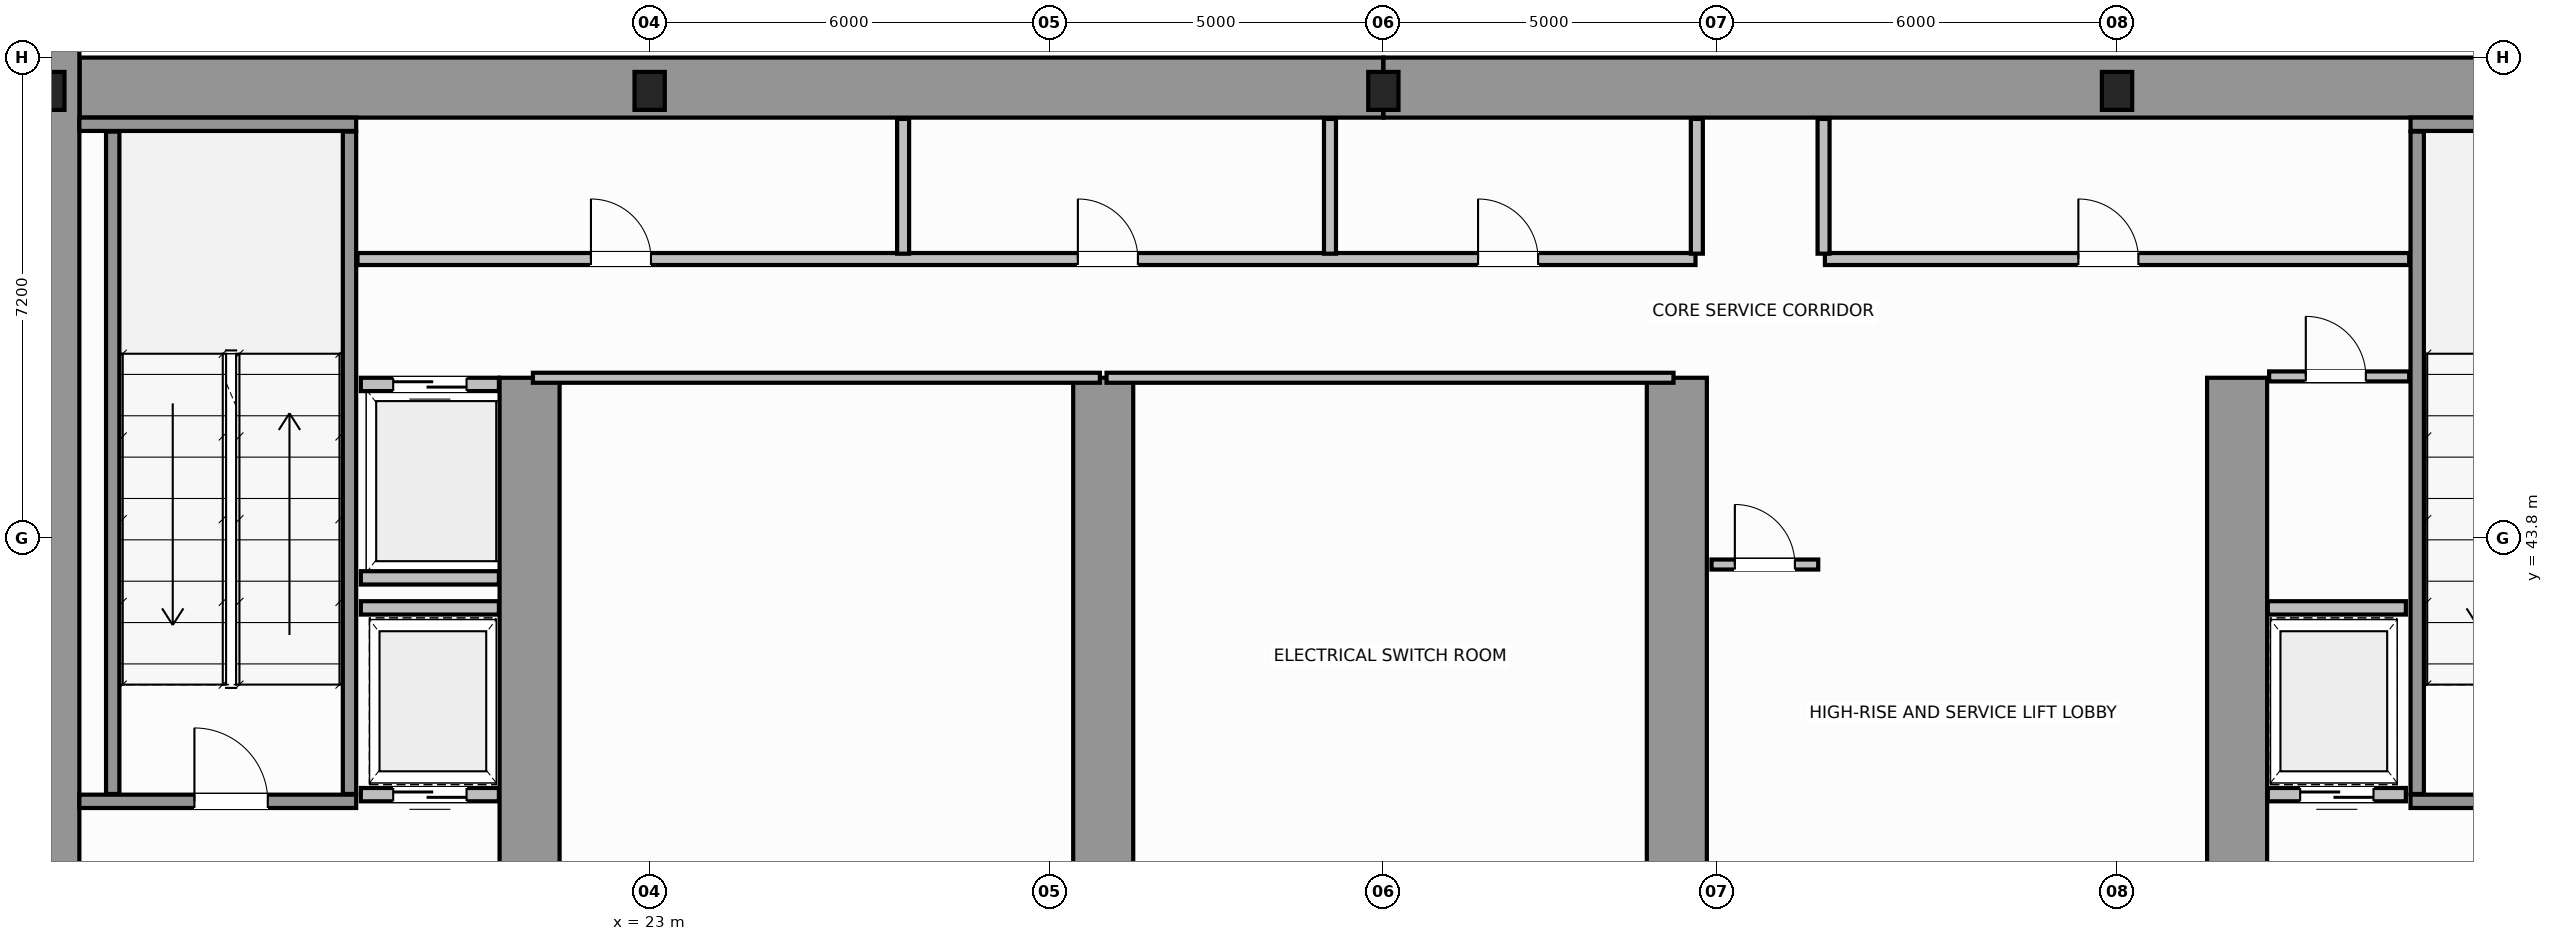
"""IFC4 building model, lengths in metres.
Left out: names, types, materials, properties, quantities, classifications, styles, units other than length and angle.
Written with IfcOpenShell. Run it as: python <this file> out.ifc"""

import sys

from ifc_helpers import new_model, si_unit, direction, frame, frame_2d, origin, origin_2d, place, context, subcontext, project, spatial, rectangle, i_section, extrude, source, transform, mapped, element, fill, save


model = new_model("IFC4")
c1 = context("Model", 3, precision=1e-05, world=origin(), true_north=direction((0.0, 1.0)))
c2 = subcontext(c1, "Body", "Model", "MODEL_VIEW")
j1 = project(units=[si_unit("LENGTHUNIT", "METRE"), si_unit("PLANEANGLEUNIT", "RADIAN")], contexts=[c1])
p1 = place(None, origin())
s1 = spatial("IfcSite", under=j1, at=p1, CompositionType="ELEMENT")
p2 = place(p1, origin())
s2 = spatial("IfcBuilding", under=s1, at=p2, CompositionType="ELEMENT")
p3 = place(p2, frame((0.0, 0.0, -10.4)))
s3 = spatial("IfcBuildingStorey", under=s2, at=p3, CompositionType="ELEMENT", Elevation=-10.4)
m1 = source(origin(), c2, "Body", "SweptSolid", [
    extrude(i_section(OverallWidth=0.454, OverallDepth=0.569, WebThickness=0.078, FlangeThickness=0.08, FilletRadius=0.015, at=origin_2d()), origin(), (0.0, 0.0, 1.0), 5.2),
])
for number, where, z_axis, x_axis in (
    (1, (14.0, 50.5, 0.0), (0.0, 0.0, 1.0), (1.0, 0.0, 0.0)),
    (2, (23.0, 50.5, 0.0), (0.0, 0.0, 1.0), (1.0, 0.0, 0.0)),
    (3, (34.0, 50.5, 0.0), (0.0, 0.0, 1.0), (1.0, 0.0, 0.0)),
    (4, (45.0, 50.5, 0.0), (0.0, 0.0, 1.0), (1.0, 0.0, 0.0)),
):
    element("IfcColumn", number, at=place(p3, frame(where, z_axis=z_axis, x_axis=x_axis)), inside=s3, PredefinedType="COLUMN", context=c2, shape_type="MappedRepresentation", body=[
        mapped(m1, transform((0.0, 0.0, 0.0), scale=1.0)),
    ])
for number, where, z_axis, x_axis in (
    (5, (14.454, 50.55, 0.0), (0.0, 0.0, 1.0), (1.0, 0.0, 0.0)),
    (6, (34.002, 50.55, 0.0), (0.0, 0.0, 1.0), (1.0, 0.0, 0.0)),
):
    element("IfcWall", number, at=place(p3, frame(where, z_axis=z_axis, x_axis=x_axis)), inside=s3, PredefinedType="SHEAR", context=c2, shape_type="SweptSolid", body=[
        extrude(rectangle(XDim=19.544, YDim=0.9, at=frame_2d((9.772, 0.0))), origin(), (0.0, 0.0, 1.0), 5.2),
    ])
p4 = place(p3, frame((14.0, 36.5, 0.0), z_axis=(0.0, 0.0, 1.0), x_axis=(0.0, 1.0, 0.0)))
e7 = element("IfcWall", 7, at=p4, inside=s3, PredefinedType="SHEAR", context=c2, shape_type="SweptSolid", body=[
    extrude(rectangle(XDim=15.0, YDim=0.9, at=frame_2d((7.5, 0.0))), origin(), (0.0, 0.0, 1.0), 5.2),
])
for number, where, z_axis, x_axis in (
    (8, (21.2, 36.97, 0.0), (0.0, 0.0, 1.0), (0.0, 1.0, 0.0)),
    (9, (29.8, 36.97, 0.0), (0.0, 0.0, 1.0), (0.0, 1.0, 0.0)),
    (10, (38.4, 36.97, 0.0), (0.0, 0.0, 1.0), (0.0, 1.0, 0.0)),
    (11, (46.8, 36.97, 0.0), (0.0, 0.0, 1.0), (0.0, 1.0, 0.0)),
):
    element("IfcWall", number, at=place(p3, frame(where, z_axis=z_axis, x_axis=x_axis)), inside=s3, PredefinedType="SHEAR", context=c2, shape_type="SweptSolid", body=[
        extrude(rectangle(XDim=9.23, YDim=0.9, at=frame_2d((4.615, 0.0))), origin(), (0.0, 0.0, 1.0), 5.2),
    ])
p5 = place(p3, frame((14.45, 39.85, 0.0), z_axis=(0.0, 0.0, 1.0), x_axis=(1.0, 0.0, 0.0)))
e12 = element("IfcWall", 12, at=p5, inside=s3, PredefinedType="SOLIDWALL", context=c2, shape_type="SweptSolid", body=[
    extrude(rectangle(XDim=4.15, YDim=0.2, at=frame_2d((2.075, 0.0))), origin(), (0.0, 0.0, 1.0), 5.2),
])
p6 = place(p5, frame((1.725, 0.0, 0.0)))
e13 = element("IfcOpeningElement", 13, at=p6, cuts=e12, PredefinedType="OPENING", context=c2, shape_type="SweptSolid", body=[
    extrude(rectangle(XDim=1.1, YDim=2.15, at=frame_2d((0.55, 1.075))), frame((0.0, 0.11, 0.0), z_axis=(0.0, -1.0, 0.0), x_axis=(1.0, 0.0, 0.0)), (0.0, 0.0, 1.0), 0.22),
])
p7 = place(p3, frame((14.45, 50.0, 0.0), z_axis=(0.0, 0.0, 1.0), x_axis=(1.0, 0.0, 0.0)))
e14 = element("IfcWall", 14, at=p7, inside=s3, PredefinedType="SOLIDWALL", context=c2, shape_type="SweptSolid", body=[
    extrude(rectangle(XDim=4.15, YDim=0.2, at=frame_2d((2.075, 0.0))), origin(), (0.0, 0.0, 1.0), 5.2),
])
for number, where, z_axis, x_axis in (
    (15, (14.95, 39.96, 0.0), (0.0, 0.0, 1.0), (0.0, 1.0, 0.0)),
    (16, (18.5, 39.96, 0.0), (0.0, 0.0, 1.0), (0.0, 1.0, 0.0)),
):
    element("IfcWall", number, at=place(p3, frame(where, z_axis=z_axis, x_axis=x_axis)), inside=s3, PredefinedType="SOLIDWALL", context=c2, shape_type="SweptSolid", body=[
        extrude(rectangle(XDim=9.93, YDim=0.2, at=frame_2d((4.965, 0.0))), origin(), (0.0, 0.0, 1.0), 5.2),
    ])
p8 = place(p3, frame((49.4, 39.85, 0.0), z_axis=(0.0, 0.0, 1.0), x_axis=(1.0, 0.0, 0.0)))
e17 = element("IfcWall", 17, at=p8, inside=s3, PredefinedType="SOLIDWALL", context=c2, shape_type="SweptSolid", body=[
    extrude(rectangle(XDim=4.15, YDim=0.2, at=frame_2d((2.075, 0.0))), origin(), (0.0, 0.0, 1.0), 5.2),
])
p9 = place(p8, frame((1.325, 0.0, 0.0)))
e18 = element("IfcOpeningElement", 18, at=p9, cuts=e17, PredefinedType="OPENING", context=c2, shape_type="SweptSolid", body=[
    extrude(rectangle(XDim=1.1, YDim=2.15, at=frame_2d((0.55, 1.075))), frame((0.0, 0.11, 0.0), z_axis=(0.0, -1.0, 0.0), x_axis=(1.0, 0.0, 0.0)), (0.0, 0.0, 1.0), 0.22),
])
p10 = place(p3, frame((49.4, 50.0, 0.0), z_axis=(0.0, 0.0, 1.0), x_axis=(1.0, 0.0, 0.0)))
e19 = element("IfcWall", 19, at=p10, inside=s3, PredefinedType="SOLIDWALL", context=c2, shape_type="SweptSolid", body=[
    extrude(rectangle(XDim=4.15, YDim=0.2, at=frame_2d((2.075, 0.0))), origin(), (0.0, 0.0, 1.0), 5.2),
])
p11 = place(p3, frame((49.5, 39.96, 0.0), z_axis=(0.0, 0.0, 1.0), x_axis=(0.0, 1.0, 0.0)))
e20 = element("IfcWall", 20, at=p11, inside=s3, PredefinedType="SOLIDWALL", context=c2, shape_type="SweptSolid", body=[
    extrude(rectangle(XDim=9.93, YDim=0.2, at=frame_2d((4.965, 0.0))), origin(), (0.0, 0.0, 1.0), 5.2),
])
p12 = place(p3, frame((18.67, 46.1, 0.0), z_axis=(0.0, 0.0, 1.0), x_axis=(1.0, 0.0, 0.0)))
e21 = element("IfcWall", 21, at=p12, inside=s3, PredefinedType="SOLIDWALL", context=c2, shape_type="SweptSolid", body=[
    extrude(rectangle(XDim=2.07, YDim=0.2, at=frame_2d((1.035, 0.0))), origin(), (0.0, 0.0, 1.0), 4.88),
])
p13 = place(p12, frame((0.485, 0.0, 0.0)))
e22 = element("IfcOpeningElement", 22, at=p13, cuts=e21, PredefinedType="OPENING", context=c2, shape_type="SweptSolid", body=[
    extrude(rectangle(XDim=1.1, YDim=2.15, at=frame_2d((0.55, 1.075))), frame((0.0, 0.11, 0.0), z_axis=(0.0, -1.0, 0.0), x_axis=(1.0, 0.0, 0.0)), (0.0, 0.0, 1.0), 0.22),
])
p14 = place(p3, frame((18.67, 43.2, 0.0), z_axis=(0.0, 0.0, 1.0), x_axis=(1.0, 0.0, 0.0)))
e23 = element("IfcWall", 23, at=p14, inside=s3, PredefinedType="SOLIDWALL", context=c2, shape_type="SweptSolid", body=[
    extrude(rectangle(XDim=2.07, YDim=0.2, at=frame_2d((1.035, 0.0))), origin(), (0.0, 0.0, 1.0), 4.88),
])
p15 = place(p3, frame((18.67, 39.95, 0.0), z_axis=(0.0, 0.0, 1.0), x_axis=(1.0, 0.0, 0.0)))
e24 = element("IfcWall", 24, at=p15, inside=s3, PredefinedType="SOLIDWALL", context=c2, shape_type="SweptSolid", body=[
    extrude(rectangle(XDim=2.07, YDim=0.2, at=frame_2d((1.035, 0.0))), origin(), (0.0, 0.0, 1.0), 4.88),
])
p16 = place(p15, frame((0.485, 0.0, 0.0)))
e25 = element("IfcOpeningElement", 25, at=p16, cuts=e24, PredefinedType="OPENING", context=c2, shape_type="SweptSolid", body=[
    extrude(rectangle(XDim=1.1, YDim=2.15, at=frame_2d((0.55, 1.075))), frame((0.0, 0.11, 0.0), z_axis=(0.0, -1.0, 0.0), x_axis=(1.0, 0.0, 0.0)), (0.0, 0.0, 1.0), 0.22),
])
p17 = place(p3, frame((18.67, 42.75, 0.0), z_axis=(0.0, 0.0, 1.0), x_axis=(1.0, 0.0, 0.0)))
e26 = element("IfcWall", 26, at=p17, inside=s3, PredefinedType="SOLIDWALL", context=c2, shape_type="SweptSolid", body=[
    extrude(rectangle(XDim=2.07, YDim=0.2, at=frame_2d((1.035, 0.0))), origin(), (0.0, 0.0, 1.0), 4.88),
])
p18 = place(p3, frame((47.26, 39.95, 0.0), z_axis=(0.0, 0.0, 1.0), x_axis=(1.0, 0.0, 0.0)))
e27 = element("IfcWall", 27, at=p18, inside=s3, PredefinedType="SOLIDWALL", context=c2, shape_type="SweptSolid", body=[
    extrude(rectangle(XDim=2.07, YDim=0.2, at=frame_2d((1.035, 0.0))), origin(), (0.0, 0.0, 1.0), 4.88),
])
p19 = place(p18, frame((0.485, 0.0, 0.0)))
e28 = element("IfcOpeningElement", 28, at=p19, cuts=e27, PredefinedType="OPENING", context=c2, shape_type="SweptSolid", body=[
    extrude(rectangle(XDim=1.1, YDim=2.15, at=frame_2d((0.55, 1.075))), frame((0.0, 0.11, 0.0), z_axis=(0.0, -1.0, 0.0), x_axis=(1.0, 0.0, 0.0)), (0.0, 0.0, 1.0), 0.22),
])
p20 = place(p3, frame((47.26, 42.75, 0.0), z_axis=(0.0, 0.0, 1.0), x_axis=(1.0, 0.0, 0.0)))
e29 = element("IfcWall", 29, at=p20, inside=s3, PredefinedType="SOLIDWALL", context=c2, shape_type="SweptSolid", body=[
    extrude(rectangle(XDim=2.07, YDim=0.2, at=frame_2d((1.035, 0.0))), origin(), (0.0, 0.0, 1.0), 4.88),
])
for number, where, z_axis, x_axis in (
    (30, (21.25, 46.2, 0.0), (0.0, 0.0, 1.0), (1.0, 0.0, 0.0)),
    (31, (29.85, 46.2, 0.0), (0.0, 0.0, 1.0), (1.0, 0.0, 0.0)),
):
    element("IfcWall", number, at=place(p3, frame(where, z_axis=z_axis, x_axis=x_axis)), inside=s3, PredefinedType="PARTITIONING", context=c2, shape_type="SweptSolid", body=[
        extrude(rectangle(XDim=8.5, YDim=0.15, at=frame_2d((4.25, 0.0))), origin(), (0.0, 0.0, 1.0), 4.88),
    ])
p21 = place(p3, frame((47.28, 46.22, 0.0), z_axis=(0.0, 0.0, 1.0), x_axis=(1.0, 0.0, 0.0)))
e32 = element("IfcWall", 32, at=p21, inside=s3, PredefinedType="PARTITIONING", context=c2, shape_type="SweptSolid", body=[
    extrude(rectangle(XDim=2.1, YDim=0.15, at=frame_2d((1.05, 0.0))), origin(), (0.0, 0.0, 1.0), 4.88),
])
p22 = place(p21, frame((0.55, 0.0, 0.0)))
e33 = element("IfcOpeningElement", 33, at=p22, cuts=e32, PredefinedType="OPENING", context=c2, shape_type="SweptSolid", body=[
    extrude(rectangle(XDim=0.9, YDim=2.1, at=frame_2d((0.45, 1.05))), frame((0.0, 0.085, 0.0), z_axis=(0.0, -1.0, 0.0), x_axis=(1.0, 0.0, 0.0)), (0.0, 0.0, 1.0), 0.17),
])
p23 = place(p3, frame((38.92, 43.4, 0.0), z_axis=(0.0, 0.0, 1.0), x_axis=(1.0, 0.0, 0.0)))
e34 = element("IfcWall", 34, at=p23, inside=s3, PredefinedType="PARTITIONING", context=c2, shape_type="SweptSolid", body=[
    extrude(rectangle(XDim=1.6, YDim=0.15, at=frame_2d((0.8, 0.0))), origin(), (0.0, 0.0, 1.0), 4.88),
])
p24 = place(p23, frame((0.35, 0.0, 0.0)))
e35 = element("IfcOpeningElement", 35, at=p24, cuts=e34, PredefinedType="OPENING", context=c2, shape_type="SweptSolid", body=[
    extrude(rectangle(XDim=0.9, YDim=2.1, at=frame_2d((0.45, 1.05))), frame((0.0, 0.085, 0.0), z_axis=(0.0, -1.0, 0.0), x_axis=(1.0, 0.0, 0.0)), (0.0, 0.0, 1.0), 0.17),
])
p25 = place(p3, frame((18.62, 47.98, 0.0), z_axis=(0.0, 0.0, 1.0), x_axis=(1.0, 0.0, 0.0)))
e36 = element("IfcWall", 36, at=p25, inside=s3, PredefinedType="PLUMBINGWALL", context=c2, shape_type="SweptSolid", body=[
    extrude(rectangle(XDim=20.06, YDim=0.18, at=frame_2d((10.03, 0.0))), origin(), (0.0, 0.0, 1.0), 4.88),
])
p26 = place(p25, frame((3.5, 0.0, 0.0)))
e37 = element("IfcOpeningElement", 37, at=p26, cuts=e36, PredefinedType="OPENING", context=c2, shape_type="SweptSolid", body=[
    extrude(rectangle(XDim=0.9, YDim=2.15, at=frame_2d((0.45, 1.075))), frame((0.0, 0.1, 0.0), z_axis=(0.0, -1.0, 0.0), x_axis=(1.0, 0.0, 0.0)), (0.0, 0.0, 1.0), 0.2),
])
p27 = place(p25, frame((10.8, 0.0, 0.0)))
e38 = element("IfcOpeningElement", 38, at=p27, cuts=e36, PredefinedType="OPENING", context=c2, shape_type="SweptSolid", body=[
    extrude(rectangle(XDim=0.9, YDim=2.15, at=frame_2d((0.45, 1.075))), frame((0.0, 0.1, 0.0), z_axis=(0.0, -1.0, 0.0), x_axis=(1.0, 0.0, 0.0)), (0.0, 0.0, 1.0), 0.2),
])
p28 = place(p25, frame((16.8, 0.0, 0.0)))
e39 = element("IfcOpeningElement", 39, at=p28, cuts=e36, PredefinedType="OPENING", context=c2, shape_type="SweptSolid", body=[
    extrude(rectangle(XDim=0.9, YDim=2.15, at=frame_2d((0.45, 1.075))), frame((0.0, 0.1, 0.0), z_axis=(0.0, -1.0, 0.0), x_axis=(1.0, 0.0, 0.0)), (0.0, 0.0, 1.0), 0.2),
])
p29 = place(p3, frame((40.62, 47.98, 0.0), z_axis=(0.0, 0.0, 1.0), x_axis=(1.0, 0.0, 0.0)))
e40 = element("IfcWall", 40, at=p29, inside=s3, PredefinedType="PLUMBINGWALL", context=c2, shape_type="SweptSolid", body=[
    extrude(rectangle(XDim=8.76, YDim=0.18, at=frame_2d((4.38, 0.0))), origin(), (0.0, 0.0, 1.0), 4.88),
])
p30 = place(p29, frame((3.8, 0.0, 0.0)))
e41 = element("IfcOpeningElement", 41, at=p30, cuts=e40, PredefinedType="OPENING", context=c2, shape_type="SweptSolid", body=[
    extrude(rectangle(XDim=0.9, YDim=2.15, at=frame_2d((0.45, 1.075))), frame((0.0, 0.1, 0.0), z_axis=(0.0, -1.0, 0.0), x_axis=(1.0, 0.0, 0.0)), (0.0, 0.0, 1.0), 0.2),
])
for number, where, z_axis, x_axis in (
    (42, (26.8, 48.06, 0.0), (0.0, 0.0, 1.0), (0.0, 1.0, 0.0)),
    (43, (33.2, 48.06, 0.0), (0.0, 0.0, 1.0), (0.0, 1.0, 0.0)),
    (44, (38.7, 48.06, 0.0), (0.0, 0.0, 1.0), (0.0, 1.0, 0.0)),
    (45, (40.6, 48.06, 0.0), (0.0, 0.0, 1.0), (0.0, 1.0, 0.0)),
):
    element("IfcWall", number, at=place(p3, frame(where, z_axis=z_axis, x_axis=x_axis)), inside=s3, PredefinedType="PLUMBINGWALL", context=c2, shape_type="SweptSolid", body=[
        extrude(rectangle(XDim=2.02, YDim=0.18, at=frame_2d((1.01, 0.0))), origin(), (0.0, 0.0, 1.0), 4.88),
    ])
m2 = source(origin(), c2, "Body", "SweptSolid", [
    extrude(rectangle(XDim=1.1, YDim=2.15, at=frame_2d((0.55, 1.075))), frame((0.0, 0.025, 0.0), z_axis=(0.0, -1.0, 0.0), x_axis=(1.0, 0.0, 0.0)), (0.0, 0.0, 1.0), 0.05),
])
p31 = place(p6, origin())
e46 = element("IfcDoor", 46, at=p31, inside=s3, OperationType="SINGLE_SWING_LEFT", PredefinedType="DOOR", context=c2, shape_type="MappedRepresentation", body=[
    mapped(m2, transform((0.0, 0.0, 0.0), scale=1.0)),
])
fill(e13, e46)
p32 = place(p13, origin())
e47 = element("IfcDoor", 47, at=p32, inside=s3, OperationType="DOUBLE_DOOR_SLIDING", PredefinedType="DOOR", context=c2, shape_type="MappedRepresentation", body=[
    mapped(m2, transform((0.0, 0.0, 0.0), scale=1.0)),
])
fill(e22, e47)
p33 = place(p16, origin())
e48 = element("IfcDoor", 48, at=p33, inside=s3, OperationType="DOUBLE_DOOR_SLIDING", PredefinedType="DOOR", context=c2, shape_type="MappedRepresentation", body=[
    mapped(m2, transform((0.0, 0.0, 0.0), scale=1.0)),
])
fill(e25, e48)
p34 = place(p19, origin())
e49 = element("IfcDoor", 49, at=p34, inside=s3, OperationType="DOUBLE_DOOR_SLIDING", PredefinedType="DOOR", context=c2, shape_type="MappedRepresentation", body=[
    mapped(m2, transform((0.0, 0.0, 0.0), scale=1.0)),
])
fill(e28, e49)
m3 = source(origin(), c2, "Body", "SweptSolid", [
    extrude(rectangle(XDim=0.9, YDim=2.1, at=frame_2d((0.45, 1.05))), frame((0.0, 0.025, 0.0), z_axis=(0.0, -1.0, 0.0), x_axis=(1.0, 0.0, 0.0)), (0.0, 0.0, 1.0), 0.05),
])
p35 = place(p22, origin())
e50 = element("IfcDoor", 50, at=p35, inside=s3, OperationType="SINGLE_SWING_RIGHT", PredefinedType="DOOR", context=c2, shape_type="MappedRepresentation", body=[
    mapped(m3, transform((0.0, 0.0, 0.0), scale=1.0)),
])
fill(e33, e50)
p36 = place(p24, origin())
e51 = element("IfcDoor", 51, at=p36, inside=s3, OperationType="SINGLE_SWING_LEFT", PredefinedType="DOOR", context=c2, shape_type="MappedRepresentation", body=[
    mapped(m3, transform((0.0, 0.0, 0.0), scale=1.0)),
])
fill(e35, e51)
m4 = source(origin(), c2, "Body", "SweptSolid", [
    extrude(rectangle(XDim=0.9, YDim=2.15, at=frame_2d((0.45, 1.075))), frame((0.0, 0.025, 0.0), z_axis=(0.0, -1.0, 0.0), x_axis=(1.0, 0.0, 0.0)), (0.0, 0.0, 1.0), 0.05),
])
p37 = place(p26, origin())
e52 = element("IfcDoor", 52, at=p37, inside=s3, OperationType="SINGLE_SWING_LEFT", PredefinedType="DOOR", context=c2, shape_type="MappedRepresentation", body=[
    mapped(m4, transform((0.0, 0.0, 0.0), scale=1.0)),
])
fill(e37, e52)
p38 = place(p27, origin())
e53 = element("IfcDoor", 53, at=p38, inside=s3, OperationType="SINGLE_SWING_RIGHT", PredefinedType="DOOR", context=c2, shape_type="MappedRepresentation", body=[
    mapped(m4, transform((0.0, 0.0, 0.0), scale=1.0)),
])
fill(e38, e53)
p39 = place(p28, origin())
e54 = element("IfcDoor", 54, at=p39, inside=s3, OperationType="SINGLE_SWING_LEFT", PredefinedType="DOOR", context=c2, shape_type="MappedRepresentation", body=[
    mapped(m4, transform((0.0, 0.0, 0.0), scale=1.0)),
])
fill(e39, e54)
p40 = place(p30, origin())
e55 = element("IfcDoor", 55, at=p40, inside=s3, OperationType="SINGLE_SWING_RIGHT", PredefinedType="DOOR", context=c2, shape_type="MappedRepresentation", body=[
    mapped(m4, transform((0.0, 0.0, 0.0), scale=1.0)),
])
fill(e41, e55)
save(model, sys.argv[1])
